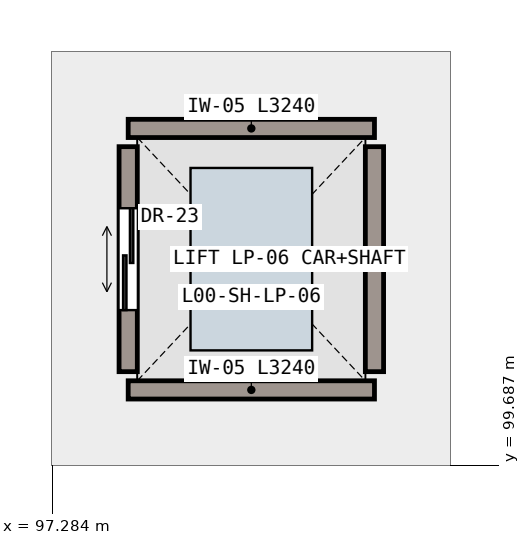
"""IFC4 building model, lengths in metres.
Left out: names, types, materials, properties, quantities, classifications, styles, units other than length and angle.
Written with IfcOpenShell. Run it as: python <this file> out.ifc"""

import sys

from ifc_helpers import new_model, si_unit, direction, frame, frame_2d, origin, place, context, subcontext, project, spatial, rectangle, extrude, element, fill, save


model = new_model("IFC4")
c1 = context("Model", 3, precision=1e-05, world=origin(), true_north=direction((0.0, 1.0)))
c2 = subcontext(c1, "Body", "Model", "MODEL_VIEW")
j1 = project(units=[si_unit("LENGTHUNIT", "METRE"), si_unit("PLANEANGLEUNIT", "RADIAN")], contexts=[c1])
p1 = place(None, origin())
s1 = spatial("IfcSite", under=j1, at=p1, CompositionType="ELEMENT")
p2 = place(p1, origin())
s2 = spatial("IfcBuilding", under=s1, at=p2, CompositionType="ELEMENT")
p3 = place(p2, origin())
s3 = spatial("IfcBuildingStorey", under=s2, at=p3, CompositionType="ELEMENT", Elevation=0.0)
for number, where, z_axis, x_axis in (
    (1, (101.52, 100.68, 0.0), (0.0, 0.0, 1.0), (-1.0, 0.0, 0.0)),
    (2, (98.28, 104.12, 0.0), (0.0, 0.0, 1.0), (1.0, 0.0, 0.0)),
):
    element("IfcWall", number, at=place(p3, frame(where, z_axis=z_axis, x_axis=x_axis)), inside=s3, PredefinedType="SHEAR", context=c2, shape_type="SweptSolid", body=[
        extrude(rectangle(XDim=3.24, YDim=0.24, at=frame_2d((1.62, 0.0))), origin(), (0.0, 0.0, 1.0), 5.12),
    ])
p4 = place(p3, frame((98.28, 100.92, 0.0), z_axis=(0.0, 0.0, 1.0), x_axis=(0.0, 1.0, 0.0)))
e3 = element("IfcWall", 3, at=p4, inside=s3, PredefinedType="SHEAR", context=c2, shape_type="SweptSolid", body=[
    extrude(rectangle(XDim=2.96, YDim=0.24, at=frame_2d((1.48, 0.0))), origin(), (0.0, 0.0, 1.0), 5.12),
])
p5 = place(p4, frame((0.81, 0.0, 0.0)))
e4 = element("IfcOpeningElement", 4, at=p5, cuts=e3, PredefinedType="OPENING", context=c2, shape_type="SweptSolid", body=[
    extrude(rectangle(XDim=1.34, YDim=2.18, at=frame_2d((0.67, 1.09))), frame((0.0, 0.13, 0.0), z_axis=(0.0, -1.0, 0.0), x_axis=(1.0, 0.0, 0.0)), (0.0, 0.0, 1.0), 0.26),
])
p6 = place(p3, frame((101.52, 103.88, 0.0), z_axis=(0.0, 0.0, 1.0), x_axis=(0.0, -1.0, 0.0)))
e5 = element("IfcWall", 5, at=p6, inside=s3, PredefinedType="SHEAR", context=c2, shape_type="SweptSolid", body=[
    extrude(rectangle(XDim=2.96, YDim=0.24, at=frame_2d((1.48, 0.0))), origin(), (0.0, 0.0, 1.0), 5.12),
])
p7 = place(p5, origin())
e6 = element("IfcDoor", 6, at=p7, inside=s3, OperationType="DOUBLE_DOOR_SLIDING", PredefinedType="DOOR", context=c2, shape_type="SweptSolid", body=[
    extrude(rectangle(XDim=1.34, YDim=2.18, at=frame_2d((0.67, 1.09))), frame((0.0, 0.025, 0.0), z_axis=(0.0, -1.0, 0.0), x_axis=(1.0, 0.0, 0.0)), (0.0, 0.0, 1.0), 0.05),
])
fill(e4, e6)
save(model, sys.argv[1])
